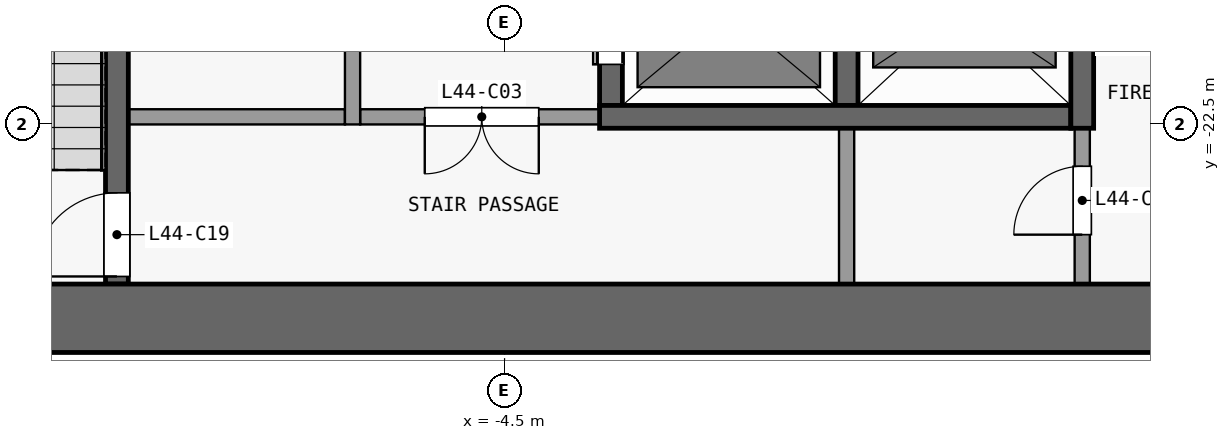
"""IFC4 building model, lengths in metres.
Left out: names, types, materials, properties, quantities, classifications, styles, units other than length and angle.
Written with IfcOpenShell. Run it as: python <this file> out.ifc"""

import sys

from ifc_helpers import new_model, si_unit, direction, frame, frame_2d, origin, place, context, subcontext, project, spatial, rectangle, extrude, element, fill, save


model = new_model("IFC4")
c1 = context("Model", 3, precision=1e-05, world=origin(), true_north=direction((0.0, 1.0)))
c2 = subcontext(c1, "Body", "Model", "MODEL_VIEW")
j1 = project(units=[si_unit("LENGTHUNIT", "METRE"), si_unit("PLANEANGLEUNIT", "RADIAN")], contexts=[c1])
p1 = place(None, origin())
s1 = spatial("IfcSite", under=j1, at=p1, CompositionType="ELEMENT")
p2 = place(p1, origin())
s2 = spatial("IfcBuilding", under=s1, at=p2, CompositionType="ELEMENT")
p3 = place(p2, frame((0.0, 0.0, 178.1)))
s3 = spatial("IfcBuildingStorey", under=s2, at=p3, CompositionType="ELEMENT", Elevation=178.1)
p4 = place(p3, frame((-13.3, -25.05, 0.0), z_axis=(0.0, 0.0, 1.0), x_axis=(1.0, 0.0, 0.0)))
e1 = element("IfcWall", 1, at=p4, inside=s3, PredefinedType="SHEAR", context=c2, shape_type="SweptSolid", body=[
    extrude(rectangle(XDim=26.6, YDim=0.9, at=frame_2d((13.3, 0.0))), origin(), (0.0, 0.0, 1.0), 3.3),
])
p5 = place(p3, frame((-9.45, -22.4, 0.0), z_axis=(0.0, 0.0, 1.0), x_axis=(1.0, 0.0, 0.0)))
e2 = element("IfcWall", 2, at=p5, inside=s3, PredefinedType="PARTITIONING", context=c2, shape_type="SweptSolid", body=[
    extrude(rectangle(XDim=2.85, YDim=0.2, at=frame_2d((1.425, 0.0))), origin(), (0.0, 0.0, 1.0), 3.3),
])
p6 = place(p3, frame((-3.25, -22.4, 0.0), z_axis=(0.0, 0.0, 1.0), x_axis=(-1.0, 0.0, 0.0)))
e3 = element("IfcWall", 3, at=p6, inside=s3, PredefinedType="PARTITIONING", context=c2, shape_type="SweptSolid", body=[
    extrude(rectangle(XDim=3.15, YDim=0.2, at=frame_2d((1.575, 0.0))), origin(), (0.0, 0.0, 1.0), 3.3),
])
p7 = place(p6, frame((0.8, 0.0, 0.0)))
e4 = element("IfcOpeningElement", 4, at=p7, cuts=e3, PredefinedType="OPENING", context=c2, shape_type="SweptSolid", body=[
    extrude(rectangle(XDim=1.5, YDim=2.1, at=frame_2d((0.75, 1.05))), frame((0.0, 0.11, 0.0), z_axis=(0.0, -1.0, 0.0), x_axis=(1.0, 0.0, 0.0)), (0.0, 0.0, 1.0), 0.22),
])
p8 = place(p3, frame((-3.25, -22.4, 0.0), z_axis=(0.0, 0.0, 1.0), x_axis=(1.0, 0.0, 0.0)))
e5 = element("IfcWall", 5, at=p8, inside=s3, PredefinedType="SHEAR", context=c2, shape_type="SweptSolid", body=[
    extrude(rectangle(XDim=6.2, YDim=0.3, at=frame_2d((3.1, 0.0))), origin(), (0.0, 0.0, 1.0), 3.3),
])
p9 = place(p3, frame((-9.6, -24.6, 0.0), z_axis=(0.0, 0.0, 1.0), x_axis=(0.0, 1.0, 0.0)))
e6 = element("IfcWall", 6, at=p9, inside=s3, PredefinedType="SHEAR", context=c2, shape_type="SweptSolid", body=[
    extrude(rectangle(XDim=7.7, YDim=0.3, at=frame_2d((3.85, 0.0))), origin(), (0.0, 0.0, 1.0), 3.3),
])
p10 = place(p9, frame((0.1, 0.0, 0.0)))
e7 = element("IfcOpeningElement", 7, at=p10, cuts=e6, PredefinedType="OPENING", context=c2, shape_type="SweptSolid", body=[
    extrude(rectangle(XDim=1.1, YDim=2.1, at=frame_2d((0.55, 1.05))), frame((0.0, 0.16, 0.0), z_axis=(0.0, -1.0, 0.0), x_axis=(1.0, 0.0, 0.0)), (0.0, 0.0, 1.0), 0.32),
])
p11 = place(p3, frame((-6.5, -22.5, 0.0), z_axis=(0.0, 0.0, 1.0), x_axis=(0.0, 1.0, 0.0)))
e8 = element("IfcWall", 8, at=p11, inside=s3, PredefinedType="PARTITIONING", context=c2, shape_type="SweptSolid", body=[
    extrude(rectangle(XDim=8.54, YDim=0.2, at=frame_2d((4.27, 0.0))), origin(), (0.0, 0.0, 1.0), 3.3),
])
p12 = place(p11, frame((3.67, 0.0, 0.0)))
e9 = element("IfcOpeningElement", 9, at=p12, cuts=e8, PredefinedType="OPENING", context=c2, shape_type="SweptSolid", body=[
    extrude(rectangle(XDim=1.2, YDim=2.1, at=frame_2d((0.6, 1.05))), frame((0.0, 0.11, 0.0), z_axis=(0.0, -1.0, 0.0), x_axis=(1.0, 0.0, 0.0)), (0.0, 0.0, 1.0), 0.22),
])
p13 = place(p3, frame((-3.1, -22.25, 0.0), z_axis=(0.0, 0.0, 1.0), x_axis=(0.0, 1.0, 0.0)))
e10 = element("IfcWall", 10, at=p13, inside=s3, PredefinedType="SHEAR", context=c2, shape_type="SweptSolid", body=[
    extrude(rectangle(XDim=2.48, YDim=0.3, at=frame_2d((1.24, 0.0))), origin(), (0.0, 0.0, 1.0), 3.3),
])
p14 = place(p13, frame((0.54, 0.0, 0.0)))
e11 = element("IfcOpeningElement", 11, at=p14, cuts=e10, PredefinedType="OPENING", context=c2, shape_type="SweptSolid", body=[
    extrude(rectangle(XDim=1.4, YDim=2.1, at=frame_2d((0.7, 1.05))), frame((0.0, 0.16, 0.0), z_axis=(0.0, -1.0, 0.0), x_axis=(1.0, 0.0, 0.0)), (0.0, 0.0, 1.0), 0.32),
])
p15 = place(p3, frame((0.0, -24.6, 0.0), z_axis=(0.0, 0.0, 1.0), x_axis=(0.0, 1.0, 0.0)))
e12 = element("IfcWall", 12, at=p15, inside=s3, PredefinedType="PARTITIONING", context=c2, shape_type="SweptSolid", body=[
    extrude(rectangle(XDim=2.05, YDim=0.2, at=frame_2d((1.025, 0.0))), origin(), (0.0, 0.0, 1.0), 3.3),
])
p16 = place(p3, frame((0.0, -22.25, 0.0), z_axis=(0.0, 0.0, 1.0), x_axis=(0.0, 1.0, 0.0)))
e13 = element("IfcWall", 13, at=p16, inside=s3, PredefinedType="SHEAR", context=c2, shape_type="SweptSolid", body=[
    extrude(rectangle(XDim=13.75, YDim=0.3, at=frame_2d((6.875, 0.0))), origin(), (0.0, 0.0, 1.0), 3.3),
])
p17 = place(p3, frame((3.1, -24.6, 0.0), z_axis=(0.0, 0.0, 1.0), x_axis=(0.0, 1.0, 0.0)))
e14 = element("IfcWall", 14, at=p17, inside=s3, PredefinedType="PARTITIONING", context=c2, shape_type="SweptSolid", body=[
    extrude(rectangle(XDim=2.05, YDim=0.2, at=frame_2d((1.025, 0.0))), origin(), (0.0, 0.0, 1.0), 3.3),
])
p18 = place(p17, frame((0.65, 0.0, 0.0)))
e15 = element("IfcOpeningElement", 15, at=p18, cuts=e14, PredefinedType="OPENING", context=c2, shape_type="SweptSolid", body=[
    extrude(rectangle(XDim=0.9, YDim=2.1, at=frame_2d((0.45, 1.05))), frame((0.0, 0.11, 0.0), z_axis=(0.0, -1.0, 0.0), x_axis=(1.0, 0.0, 0.0)), (0.0, 0.0, 1.0), 0.22),
])
p19 = place(p3, frame((3.1, -22.55, 0.0), z_axis=(0.0, 0.0, 1.0), x_axis=(0.0, 1.0, 0.0)))
e16 = element("IfcWall", 16, at=p19, inside=s3, PredefinedType="SHEAR", context=c2, shape_type="SweptSolid", body=[
    extrude(rectangle(XDim=14.05, YDim=0.3, at=frame_2d((7.025, 0.0))), origin(), (0.0, 0.0, 1.0), 3.3),
])
p20 = place(p19, frame((1.05, 0.0, 0.0)))
e17 = element("IfcOpeningElement", 17, at=p20, cuts=e16, PredefinedType="OPENING", context=c2, shape_type="SweptSolid", body=[
    extrude(rectangle(XDim=1.1, YDim=2.1, at=frame_2d((0.55, 1.05))), frame((0.0, 0.16, 0.0), z_axis=(0.0, -1.0, 0.0), x_axis=(1.0, 0.0, 0.0)), (0.0, 0.0, 1.0), 0.32),
])
p21 = place(p19, frame((3.875, 0.0, 0.0)))
e18 = element("IfcOpeningElement", 18, at=p21, cuts=e16, PredefinedType="OPENING", context=c2, shape_type="SweptSolid", body=[
    extrude(rectangle(XDim=1.1, YDim=2.1, at=frame_2d((0.55, 1.05))), frame((0.0, 0.16, 0.0), z_axis=(0.0, -1.0, 0.0), x_axis=(1.0, 0.0, 0.0)), (0.0, 0.0, 1.0), 0.32),
])
p22 = place(p19, frame((6.625, 0.0, 0.0)))
e19 = element("IfcOpeningElement", 19, at=p22, cuts=e16, PredefinedType="OPENING", context=c2, shape_type="SweptSolid", body=[
    extrude(rectangle(XDim=1.1, YDim=2.1, at=frame_2d((0.55, 1.05))), frame((0.0, 0.16, 0.0), z_axis=(0.0, -1.0, 0.0), x_axis=(1.0, 0.0, 0.0)), (0.0, 0.0, 1.0), 0.32),
])
p23 = place(p19, frame((9.375, 0.0, 0.0)))
e20 = element("IfcOpeningElement", 20, at=p23, cuts=e16, PredefinedType="OPENING", context=c2, shape_type="SweptSolid", body=[
    extrude(rectangle(XDim=1.1, YDim=2.1, at=frame_2d((0.55, 1.05))), frame((0.0, 0.16, 0.0), z_axis=(0.0, -1.0, 0.0), x_axis=(1.0, 0.0, 0.0)), (0.0, 0.0, 1.0), 0.32),
])
p24 = place(p19, frame((12.125, 0.0, 0.0)))
e21 = element("IfcOpeningElement", 21, at=p24, cuts=e16, PredefinedType="OPENING", context=c2, shape_type="SweptSolid", body=[
    extrude(rectangle(XDim=1.1, YDim=2.1, at=frame_2d((0.55, 1.05))), frame((0.0, 0.16, 0.0), z_axis=(0.0, -1.0, 0.0), x_axis=(1.0, 0.0, 0.0)), (0.0, 0.0, 1.0), 0.32),
])
p25 = place(p14, origin())
e22 = element("IfcDoor", 22, at=p25, inside=s3, OperationType="DOUBLE_DOOR_SLIDING", PredefinedType="DOOR", context=c2, shape_type="SweptSolid", body=[
    extrude(rectangle(XDim=1.4, YDim=2.1, at=frame_2d((0.7, 1.05))), frame((0.0, 0.025, 0.0), z_axis=(0.0, -1.0, 0.0), x_axis=(1.0, 0.0, 0.0)), (0.0, 0.0, 1.0), 0.05),
])
fill(e11, e22)
p26 = place(p7, origin())
e23 = element("IfcDoor", 23, at=p26, inside=s3, OperationType="DOUBLE_DOOR_SINGLE_SWING", PredefinedType="DOOR", context=c2, shape_type="SweptSolid", body=[
    extrude(rectangle(XDim=1.5, YDim=2.1, at=frame_2d((0.75, 1.05))), frame((0.0, 0.025, 0.0), z_axis=(0.0, -1.0, 0.0), x_axis=(1.0, 0.0, 0.0)), (0.0, 0.0, 1.0), 0.05),
])
fill(e4, e23)
p27 = place(p18, origin())
e24 = element("IfcDoor", 24, at=p27, inside=s3, OperationType="SINGLE_SWING_LEFT", PredefinedType="DOOR", context=c2, shape_type="SweptSolid", body=[
    extrude(rectangle(XDim=0.9, YDim=2.1, at=frame_2d((0.45, 1.05))), frame((0.0, 0.025, 0.0), z_axis=(0.0, -1.0, 0.0), x_axis=(1.0, 0.0, 0.0)), (0.0, 0.0, 1.0), 0.05),
])
fill(e15, e24)
p28 = place(p10, origin())
e25 = element("IfcDoor", 25, at=p28, inside=s3, OperationType="SINGLE_SWING_LEFT", PredefinedType="DOOR", context=c2, shape_type="SweptSolid", body=[
    extrude(rectangle(XDim=1.1, YDim=2.1, at=frame_2d((0.55, 1.05))), frame((0.0, 0.025, 0.0), z_axis=(0.0, -1.0, 0.0), x_axis=(1.0, 0.0, 0.0)), (0.0, 0.0, 1.0), 0.05),
])
fill(e7, e25)
save(model, sys.argv[1])
